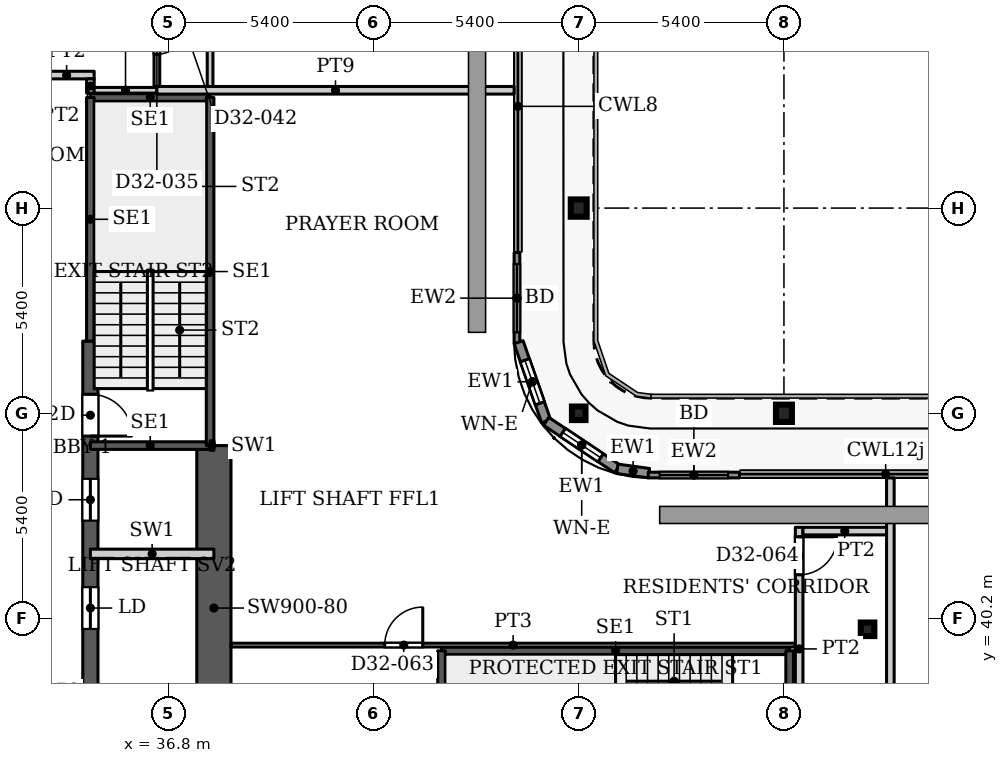
"""IFC4 building model, lengths in metres.
Left out: names, types, materials, properties, quantities, classifications, styles, units other than length and angle.
Written with IfcOpenShell. Run it as: python <this file> out.ifc"""

import sys

from ifc_helpers import new_model, si_unit, direction, frame, frame_2d, origin, origin_2d, place, context, subcontext, project, spatial, rectangle, hollow_rectangle, i_section, extrude, source, transform, mapped, element, fill, save


model = new_model("IFC4")
c1 = context("Model", 3, precision=1e-05, world=origin(), true_north=direction((0.0, 1.0)))
c2 = subcontext(c1, "Body", "Model", "MODEL_VIEW")
j1 = project(units=[si_unit("LENGTHUNIT", "METRE"), si_unit("PLANEANGLEUNIT", "RADIAN")], contexts=[c1])
p1 = place(None, origin())
s1 = spatial("IfcSite", under=j1, at=p1, CompositionType="ELEMENT")
p2 = place(p1, origin())
s2 = spatial("IfcBuilding", under=s1, at=p2, CompositionType="ELEMENT")
p3 = place(p2, frame((0.0, 0.0, 137.0)))
s3 = spatial("IfcBuildingStorey", under=s2, at=p3, CompositionType="ELEMENT", Elevation=137.0)
for number, where, z_axis, x_axis in (
    (1, (53.0, 45.6, 0.0), (0.0, 0.0, 1.0), (1.0, 0.0, 0.0)),
    (2, (47.6, 51.0, 0.0), (0.0, 0.0, 1.0), (1.0, 0.0, 0.0)),
):
    element("IfcColumn", number, at=place(p3, frame(where, z_axis=z_axis, x_axis=x_axis)), inside=s3, PredefinedType="COLUMN", context=c2, shape_type="SweptSolid", body=[
        extrude(i_section(OverallWidth=0.418, OverallDepth=0.455, WebThickness=0.042, FlangeThickness=0.068, FilletRadius=0.014, at=origin_2d()), origin(), (0.0, 0.0, 1.0), 3.9),
    ])
for number, where, z_axis, x_axis in (
    (3, (55.2, 39.916, 0.0), (0.0, 0.0, 1.0), (1.0, 0.0, 0.0)),
    (4, (47.6, 45.6, 0.0), (0.0, 0.0, 1.0), (1.0, 0.0, 0.0)),
):
    element("IfcColumn", number, at=place(p3, frame(where, z_axis=z_axis, x_axis=x_axis)), inside=s3, PredefinedType="COLUMN", context=c2, shape_type="SweptSolid", body=[
        extrude(hollow_rectangle(XDim=0.356, YDim=0.356, WallThickness=0.016, InnerFilletRadius=0.016, OuterFilletRadius=0.032, at=origin_2d()), origin(), (0.0, 0.0, 1.0), 3.9),
    ])
p4 = place(p3, frame((34.75, 29.05, 0.0), z_axis=(0.0, 0.0, 1.0), x_axis=(0.0, 1.0, 0.0)))
e5 = element("IfcWall", 5, at=p4, inside=s3, PredefinedType="SHEAR", context=c2, shape_type="SweptSolid", body=[
    extrude(rectangle(XDim=18.45, YDim=0.4, at=frame_2d((9.225, 0.0))), origin(), (0.0, 0.0, 1.0), 3.9),
])
p5 = place(p4, frame((8.025, 0.0, 0.0)))
e6 = element("IfcOpeningElement", 6, at=p5, cuts=e5, PredefinedType="OPENING", context=c2, shape_type="SweptSolid", body=[
    extrude(rectangle(XDim=1.1, YDim=2.2, at=frame_2d((0.55, 1.1))), frame((0.0, 0.21, 0.0), z_axis=(0.0, -1.0, 0.0), x_axis=(1.0, 0.0, 0.0)), (0.0, 0.0, 1.0), 0.42),
])
p6 = place(p4, frame((10.875, 0.0, 0.0)))
e7 = element("IfcOpeningElement", 7, at=p6, cuts=e5, PredefinedType="OPENING", context=c2, shape_type="SweptSolid", body=[
    extrude(rectangle(XDim=1.1, YDim=2.2, at=frame_2d((0.55, 1.1))), frame((0.0, 0.21, 0.0), z_axis=(0.0, -1.0, 0.0), x_axis=(1.0, 0.0, 0.0)), (0.0, 0.0, 1.0), 0.42),
])
p7 = place(p4, frame((13.725, 0.0, 0.0)))
e8 = element("IfcOpeningElement", 8, at=p7, cuts=e5, PredefinedType="OPENING", context=c2, shape_type="SweptSolid", body=[
    extrude(rectangle(XDim=1.1, YDim=2.2, at=frame_2d((0.55, 1.1))), frame((0.0, 0.21, 0.0), z_axis=(0.0, -1.0, 0.0), x_axis=(1.0, 0.0, 0.0)), (0.0, 0.0, 1.0), 0.42),
])
p8 = place(p4, frame((15.95, 0.0, 0.0)))
e9 = element("IfcOpeningElement", 9, at=p8, cuts=e5, PredefinedType="OPENING", context=c2, shape_type="SweptSolid", body=[
    extrude(rectangle(XDim=1.1, YDim=2.2, at=frame_2d((0.55, 1.1))), frame((0.0, 0.21, 0.0), z_axis=(0.0, -1.0, 0.0), x_axis=(1.0, 0.0, 0.0)), (0.0, 0.0, 1.0), 0.42),
])
p9 = place(p3, frame((38.0, 36.2, 0.0), z_axis=(0.0, 0.0, 1.0), x_axis=(0.0, 1.0, 0.0)))
e10 = element("IfcWall", 10, at=p9, inside=s3, PredefinedType="SHEAR", context=c2, shape_type="SweptSolid", body=[
    extrude(rectangle(XDim=8.55, YDim=0.9, at=frame_2d((4.275, 0.0))), origin(), (0.0, 0.0, 1.0), 3.9),
])
p10 = place(p3, frame((45.975, 49.83, 0.0), z_axis=(0.0, 0.0, 1.0), x_axis=(0.0, -1.0, 0.0)))
e11 = element("IfcWall", 11, at=p10, inside=s3, PredefinedType="SOLIDWALL", context=c2, shape_type="SweptSolid", body=[
    extrude(rectangle(XDim=2.4, YDim=0.15, at=frame_2d((1.2, 0.0))), origin(), (0.0, 0.0, 1.0), 3.75),
])
p11 = place(p10, frame((0.3, 0.0, 0.0)))
e12 = element("IfcOpeningElement", 12, at=p11, cuts=e11, PredefinedType="OPENING", context=c2, shape_type="SweptSolid", body=[
    extrude(rectangle(XDim=1.8, YDim=2.4, at=frame_2d((0.9, 1.2))), frame((0.0, 0.085, 0.0), z_axis=(0.0, -1.0, 0.0), x_axis=(1.0, 0.0, 0.0)), (0.0, 0.0, 1.0), 0.17),
])
p12 = place(p3, frame((46.018, 47.471, 0.0), z_axis=(0.0, 0.0, 1.0), x_axis=(0.328791208903, -0.944402637093, 0.0)))
e13 = element("IfcWall", 13, at=p12, inside=s3, PredefinedType="SOLIDWALL", context=c2, shape_type="SweptSolid", body=[
    extrude(rectangle(XDim=2.205, YDim=0.25, at=frame_2d((1.102, 0.0))), origin(), (0.0, 0.0, 1.0), 3.75),
])
p13 = place(p12, frame((0.503, 0.0, 0.6)))
e14 = element("IfcOpeningElement", 14, at=p13, cuts=e13, PredefinedType="OPENING", context=c2, shape_type="SweptSolid", body=[
    extrude(rectangle(XDim=1.2, YDim=2.1, at=frame_2d((0.6, 1.05))), frame((0.0, 0.135, 0.0), z_axis=(0.0, -1.0, 0.0), x_axis=(1.0, 0.0, 0.0)), (0.0, 0.0, 1.0), 0.27),
])
p14 = place(p3, frame((46.743, 45.389, 0.0), z_axis=(0.0, 0.0, 1.0), x_axis=(0.831449265529, -0.555600682912, 0.0)))
e15 = element("IfcWall", 15, at=p14, inside=s3, PredefinedType="SOLIDWALL", context=c2, shape_type="SweptSolid", body=[
    extrude(rectangle(XDim=2.251, YDim=0.25, at=frame_2d((1.126, 0.0))), origin(), (0.0, 0.0, 1.0), 3.75),
])
p15 = place(p14, frame((0.525, 0.0, 0.6)))
e16 = element("IfcOpeningElement", 16, at=p15, cuts=e15, PredefinedType="OPENING", context=c2, shape_type="SweptSolid", body=[
    extrude(rectangle(XDim=1.2, YDim=2.1, at=frame_2d((0.6, 1.05))), frame((0.0, 0.135, 0.0), z_axis=(0.0, -1.0, 0.0), x_axis=(1.0, 0.0, 0.0)), (0.0, 0.0, 1.0), 0.27),
])
p16 = place(p3, frame((48.615, 44.138, 0.0), z_axis=(0.0, 0.0, 1.0), x_axis=(0.990741504246, -0.135761819977, 0.0)))
e17 = element("IfcWall", 17, at=p16, inside=s3, PredefinedType="SOLIDWALL", context=c2, shape_type="SweptSolid", body=[
    extrude(rectangle(XDim=0.84, YDim=0.25, at=frame_2d((0.42, 0.0))), origin(), (0.0, 0.0, 1.0), 3.75),
])
p17 = place(p3, frame((49.43, 43.975, 0.0), z_axis=(0.0, 0.0, 1.0), x_axis=(1.0, 0.0, 0.0)))
e18 = element("IfcWall", 18, at=p17, inside=s3, PredefinedType="SOLIDWALL", context=c2, shape_type="SweptSolid", body=[
    extrude(rectangle(XDim=2.4, YDim=0.15, at=frame_2d((1.2, 0.0))), origin(), (0.0, 0.0, 1.0), 3.75),
])
p18 = place(p17, frame((0.3, 0.0, 0.0)))
e19 = element("IfcOpeningElement", 19, at=p18, cuts=e18, PredefinedType="OPENING", context=c2, shape_type="SweptSolid", body=[
    extrude(rectangle(XDim=1.8, YDim=2.4, at=frame_2d((0.9, 1.2))), frame((0.0, 0.085, 0.0), z_axis=(0.0, -1.0, 0.0), x_axis=(1.0, 0.0, 0.0)), (0.0, 0.0, 1.0), 0.17),
])
p19 = place(p3, frame((43.99, 39.35, 0.0), z_axis=(0.0, 0.0, 1.0), x_axis=(1.0, 0.0, 0.0)))
e20 = element("IfcWall", 20, at=p19, inside=s3, PredefinedType="SHEAR", context=c2, shape_type="SweptSolid", body=[
    extrude(rectangle(XDim=9.16, YDim=0.2, at=frame_2d((4.58, 0.0))), origin(), (0.0, 0.0, 1.0), 3.9),
])
for number, where, z_axis, x_axis in (
    (21, (43.99, 36.2, 0.0), (0.0, 0.0, 1.0), (0.0, 1.0, 0.0)),
    (22, (53.15, 36.2, 0.0), (0.0, 0.0, 1.0), (0.0, 1.0, 0.0)),
):
    element("IfcWall", number, at=place(p3, frame(where, z_axis=z_axis, x_axis=x_axis)), inside=s3, PredefinedType="SHEAR", context=c2, shape_type="SweptSolid", body=[
        extrude(rectangle(XDim=3.15, YDim=0.2, at=frame_2d((1.575, 0.0))), origin(), (0.0, 0.0, 1.0), 3.9),
    ])
for number, where, z_axis, x_axis in (
    (23, (34.75, 44.75, 0.0), (0.0, 0.0, 1.0), (1.0, 0.0, 0.0)),
    (24, (34.75, 53.91, 0.0), (0.0, 0.0, 1.0), (1.0, 0.0, 0.0)),
):
    element("IfcWall", number, at=place(p3, frame(where, z_axis=z_axis, x_axis=x_axis)), inside=s3, PredefinedType="SHEAR", context=c2, shape_type="SweptSolid", body=[
        extrude(rectangle(XDim=3.15, YDim=0.2, at=frame_2d((1.575, 0.0))), origin(), (0.0, 0.0, 1.0), 3.9),
    ])
p20 = place(p3, frame((34.75, 47.5, 0.0), z_axis=(0.0, 0.0, 1.0), x_axis=(0.0, 1.0, 0.0)))
e25 = element("IfcWall", 25, at=p20, inside=s3, PredefinedType="SHEAR", context=c2, shape_type="SweptSolid", body=[
    extrude(rectangle(XDim=6.41, YDim=0.2, at=frame_2d((3.205, 0.0))), origin(), (0.0, 0.0, 1.0), 3.9),
])
p21 = place(p3, frame((37.9, 44.75, 0.0), z_axis=(0.0, 0.0, 1.0), x_axis=(0.0, 1.0, 0.0)))
e26 = element("IfcWall", 26, at=p21, inside=s3, PredefinedType="SHEAR", context=c2, shape_type="SweptSolid", body=[
    extrude(rectangle(XDim=9.16, YDim=0.2, at=frame_2d((4.58, 0.0))), origin(), (0.0, 0.0, 1.0), 3.9),
])
p22 = place(p3, frame((34.75, 41.9, 0.0), z_axis=(0.0, 0.0, 1.0), x_axis=(1.0, 0.0, 0.0)))
e27 = element("IfcWall", 27, at=p22, inside=s3, PredefinedType="PARTITIONING", context=c2, shape_type="SweptSolid", body=[
    extrude(rectangle(XDim=3.25, YDim=0.25, at=frame_2d((1.625, 0.0))), origin(), (0.0, 0.0, 1.0), 3.9),
])
p23 = place(p3, frame((37.9, 44.75, 0.0), z_axis=(0.0, 0.0, 1.0), x_axis=(1.0, 0.0, 0.0)))
e28 = element("IfcWall", 28, at=p23, inside=s3, PredefinedType="PARTITIONING", context=c2, shape_type="SweptSolid", body=[
    extrude(rectangle(XDim=0.1, YDim=0.25, at=frame_2d((0.05, 0.0))), origin(), (0.0, 0.0, 1.0), 3.9),
])
p24 = place(p3, frame((33.4, 54.5, 0.0), z_axis=(0.0, 0.0, 1.0), x_axis=(1.0, 0.0, 0.0)))
e29 = element("IfcWall", 29, at=p24, inside=s3, PredefinedType="PARTITIONING", context=c2, shape_type="SweptSolid", body=[
    extrude(rectangle(XDim=1.45, YDim=0.2, at=frame_2d((0.725, 0.0))), origin(), (0.0, 0.0, 1.0), 3.6),
])
p25 = place(p3, frame((34.75, 54.025, 0.0), z_axis=(0.0, 0.0, 1.0), x_axis=(0.0, 1.0, 0.0)))
e30 = element("IfcWall", 30, at=p25, inside=s3, PredefinedType="PARTITIONING", context=c2, shape_type="SweptSolid", body=[
    extrude(rectangle(XDim=0.375, YDim=0.2, at=frame_2d((0.188, 0.0))), origin(), (0.0, 0.0, 1.0), 3.6),
])
p26 = place(p3, frame((34.85, 54.1, 0.0), z_axis=(0.0, 0.0, 1.0), x_axis=(1.0, 0.0, 0.0)))
e31 = element("IfcWall", 31, at=p26, inside=s3, PredefinedType="PARTITIONING", context=c2, shape_type="SweptSolid", body=[
    extrude(rectangle(XDim=1.65, YDim=0.15, at=frame_2d((0.825, 0.0))), origin(), (0.0, 0.0, 1.0), 3.6),
])
p27 = place(p3, frame((36.5, 54.1, 0.0), z_axis=(0.0, 0.0, 1.0), x_axis=(1.0, 0.0, 0.0)))
e32 = element("IfcWall", 32, at=p27, inside=s3, PredefinedType="PARTITIONING", context=c2, shape_type="SweptSolid", body=[
    extrude(rectangle(XDim=9.4, YDim=0.2, at=frame_2d((4.7, 0.0))), origin(), (0.0, 0.0, 1.0), 3.6),
])
p28 = place(p3, frame((36.5, 54.2, 0.0), z_axis=(0.0, 0.0, 1.0), x_axis=(0.0, 1.0, 0.0)))
e33 = element("IfcWall", 33, at=p28, inside=s3, PredefinedType="PARTITIONING", context=c2, shape_type="SweptSolid", body=[
    extrude(rectangle(XDim=11.05, YDim=0.15, at=frame_2d((5.525, 0.0))), origin(), (0.0, 0.0, 1.0), 3.6),
])
p29 = place(p28, frame((0.85, 0.0, 0.0)))
e34 = element("IfcOpeningElement", 34, at=p29, cuts=e33, PredefinedType="OPENING", context=c2, shape_type="SweptSolid", body=[
    extrude(rectangle(XDim=0.8, YDim=2.1, at=frame_2d((0.4, 1.05))), frame((0.0, 0.085, 0.0), z_axis=(0.0, -1.0, 0.0), x_axis=(1.0, 0.0, 0.0)), (0.0, 0.0, 1.0), 0.17),
])
p30 = place(p28, frame((8.35, 0.0, 0.0)))
e35 = element("IfcOpeningElement", 35, at=p30, cuts=e33, PredefinedType="OPENING", context=c2, shape_type="SweptSolid", body=[
    extrude(rectangle(XDim=0.9, YDim=2.1, at=frame_2d((0.45, 1.05))), frame((0.0, 0.085, 0.0), z_axis=(0.0, -1.0, 0.0), x_axis=(1.0, 0.0, 0.0)), (0.0, 0.0, 1.0), 0.17),
])
p31 = place(p28, frame((3.25, 0.0, 0.0)))
e36 = element("IfcOpeningElement", 36, at=p31, cuts=e33, PredefinedType="OPENING", context=c2, shape_type="SweptSolid", body=[
    extrude(rectangle(XDim=0.8, YDim=2.1, at=frame_2d((0.4, 1.05))), frame((0.0, 0.085, 0.0), z_axis=(0.0, -1.0, 0.0), x_axis=(1.0, 0.0, 0.0)), (0.0, 0.0, 1.0), 0.17),
])
p32 = place(p28, frame((5.35, 0.0, 0.0)))
e37 = element("IfcOpeningElement", 37, at=p32, cuts=e33, PredefinedType="OPENING", context=c2, shape_type="SweptSolid", body=[
    extrude(rectangle(XDim=0.8, YDim=2.1, at=frame_2d((0.4, 1.05))), frame((0.0, 0.085, 0.0), z_axis=(0.0, -1.0, 0.0), x_axis=(1.0, 0.0, 0.0)), (0.0, 0.0, 1.0), 0.17),
])
p33 = place(p3, frame((37.9, 54.2, 0.0), z_axis=(0.0, 0.0, 1.0), x_axis=(0.0, 1.0, 0.0)))
e38 = element("IfcWall", 38, at=p33, inside=s3, PredefinedType="PARTITIONING", context=c2, shape_type="SweptSolid", body=[
    extrude(rectangle(XDim=13.6, YDim=0.15, at=frame_2d((6.8, 0.0))), origin(), (0.0, 0.0, 1.0), 3.6),
])
p34 = place(p33, frame((1.25, 0.0, 0.0)))
e39 = element("IfcOpeningElement", 39, at=p34, cuts=e38, PredefinedType="OPENING", context=c2, shape_type="SweptSolid", body=[
    extrude(rectangle(XDim=0.9, YDim=2.1, at=frame_2d((0.45, 1.05))), frame((0.0, 0.085, 0.0), z_axis=(0.0, -1.0, 0.0), x_axis=(1.0, 0.0, 0.0)), (0.0, 0.0, 1.0), 0.17),
])
p35 = place(p33, frame((5.55, 0.0, 0.0)))
e40 = element("IfcOpeningElement", 40, at=p35, cuts=e38, PredefinedType="OPENING", context=c2, shape_type="SweptSolid", body=[
    extrude(rectangle(XDim=1.0, YDim=2.1, at=frame_2d((0.5, 1.05))), frame((0.0, 0.085, 0.0), z_axis=(0.0, -1.0, 0.0), x_axis=(1.0, 0.0, 0.0)), (0.0, 0.0, 1.0), 0.17),
])
p36 = place(p33, frame((11.75, 0.0, 0.0)))
e41 = element("IfcOpeningElement", 41, at=p36, cuts=e38, PredefinedType="OPENING", context=c2, shape_type="SweptSolid", body=[
    extrude(rectangle(XDim=0.9, YDim=2.1, at=frame_2d((0.45, 1.05))), frame((0.0, 0.085, 0.0), z_axis=(0.0, -1.0, 0.0), x_axis=(1.0, 0.0, 0.0)), (0.0, 0.0, 1.0), 0.17),
])
p37 = place(p3, frame((38.449, 39.5, 0.0), z_axis=(0.0, 0.0, 1.0), x_axis=(1.0, 0.0, 0.0)))
e42 = element("IfcWall", 42, at=p37, inside=s3, PredefinedType="PARTITIONING", context=c2, shape_type="SweptSolid", body=[
    extrude(rectangle(XDim=14.851, YDim=0.1, at=frame_2d((7.426, 0.0))), origin(), (0.0, 0.0, 1.0), 3.6),
])
p38 = place(p37, frame((4.047, 0.0, 0.0)))
e43 = element("IfcOpeningElement", 43, at=p38, cuts=e42, PredefinedType="OPENING", context=c2, shape_type="SweptSolid", body=[
    extrude(rectangle(XDim=1.0, YDim=2.1, at=frame_2d((0.5, 1.05))), frame((0.0, 0.06, 0.0), z_axis=(0.0, -1.0, 0.0), x_axis=(1.0, 0.0, 0.0)), (0.0, 0.0, 1.0), 0.12),
])
p39 = place(p3, frame((53.4, 36.199, 0.0), z_axis=(0.0, 0.0, 1.0), x_axis=(0.0, 1.0, 0.0)))
e44 = element("IfcWall", 44, at=p39, inside=s3, PredefinedType="PARTITIONING", context=c2, shape_type="SweptSolid", body=[
    extrude(rectangle(XDim=6.401, YDim=0.2, at=frame_2d((3.201, 0.0))), origin(), (0.0, 0.0, 1.0), 3.6),
])
p40 = place(p39, frame((5.151, 0.0, 0.0)))
e45 = element("IfcOpeningElement", 45, at=p40, cuts=e44, PredefinedType="OPENING", context=c2, shape_type="SweptSolid", body=[
    extrude(rectangle(XDim=1.0, YDim=2.1, at=frame_2d((0.5, 1.05))), frame((0.0, 0.11, 0.0), z_axis=(0.0, -1.0, 0.0), x_axis=(1.0, 0.0, 0.0)), (0.0, 0.0, 1.0), 0.22),
])
p41 = place(p3, frame((53.5, 42.5, 0.0), z_axis=(0.0, 0.0, 1.0), x_axis=(1.0, 0.0, 0.0)))
e46 = element("IfcWall", 46, at=p41, inside=s3, PredefinedType="PARTITIONING", context=c2, shape_type="SweptSolid", body=[
    extrude(rectangle(XDim=2.2, YDim=0.2, at=frame_2d((1.1, 0.0))), origin(), (0.0, 0.0, 1.0), 3.6),
])
p42 = place(p3, frame((55.8, 30.4, 0.0), z_axis=(0.0, 0.0, 1.0), x_axis=(0.0, 1.0, 0.0)))
e47 = element("IfcWall", 47, at=p42, inside=s3, PredefinedType="PARTITIONING", context=c2, shape_type="SweptSolid", body=[
    extrude(rectangle(XDim=13.5, YDim=0.2, at=frame_2d((6.75, 0.0))), origin(), (0.0, 0.0, 1.0), 3.6),
])
m1 = source(origin(), c2, "Body", "SweptSolid", [
    extrude(rectangle(XDim=1.8, YDim=2.4, at=frame_2d((0.9, 1.2))), frame((0.0, 0.025, 0.0), z_axis=(0.0, -1.0, 0.0), x_axis=(1.0, 0.0, 0.0)), (0.0, 0.0, 1.0), 0.05),
])
p43 = place(p11, origin())
e48 = element("IfcDoor", 48, at=p43, inside=s3, OperationType="SLIDING_TO_LEFT", PredefinedType="DOOR", context=c2, shape_type="MappedRepresentation", body=[
    mapped(m1, transform((0.0, 0.0, 0.0), x_axis=(1.0, 0.0, 0.0), y_axis=(0.0, 1.0, 0.0), z_axis=(0.0, 0.0, 1.0), scale=1.0)),
])
fill(e12, e48)
m2 = source(origin(), c2, "Body", "SweptSolid", [
    extrude(rectangle(XDim=1.2, YDim=2.1, at=frame_2d((0.6, 1.05))), frame((0.0, 0.03, 0.0), z_axis=(0.0, -1.0, 0.0), x_axis=(1.0, 0.0, 0.0)), (0.0, 0.0, 1.0), 0.06),
])
p44 = place(p13, origin())
e49 = element("IfcWindow", 49, at=p44, inside=s3, PartitioningType="SINGLE_PANEL", PredefinedType="WINDOW", context=c2, shape_type="MappedRepresentation", body=[
    mapped(m2, transform((0.0, 0.0, 0.0), x_axis=(1.0, 0.0, 0.0), y_axis=(0.0, 1.0, 0.0), z_axis=(0.0, 0.0, 1.0), scale=1.0)),
])
fill(e14, e49)
p45 = place(p15, origin())
e50 = element("IfcWindow", 50, at=p45, inside=s3, PartitioningType="SINGLE_PANEL", PredefinedType="WINDOW", context=c2, shape_type="MappedRepresentation", body=[
    mapped(m2, transform((0.0, 0.0, 0.0), x_axis=(1.0, 0.0, 0.0), y_axis=(0.0, 1.0, 0.0), z_axis=(0.0, 0.0, 1.0), scale=1.0)),
])
fill(e16, e50)
p46 = place(p18, origin())
e51 = element("IfcDoor", 51, at=p46, inside=s3, OperationType="SLIDING_TO_LEFT", PredefinedType="DOOR", context=c2, shape_type="MappedRepresentation", body=[
    mapped(m1, transform((0.0, 0.0, 0.0), x_axis=(1.0, 0.0, 0.0), y_axis=(0.0, 1.0, 0.0), z_axis=(0.0, 0.0, 1.0), scale=1.0)),
])
fill(e19, e51)
m3 = source(origin(), c2, "Body", "SweptSolid", [
    extrude(rectangle(XDim=1.1, YDim=2.2, at=frame_2d((0.55, 1.1))), frame((0.0, 0.025, 0.0), z_axis=(0.0, -1.0, 0.0), x_axis=(1.0, 0.0, 0.0)), (0.0, 0.0, 1.0), 0.05),
])
p47 = place(p6, origin())
e52 = element("IfcDoor", 52, at=p47, inside=s3, OperationType="SLIDING_TO_LEFT", PredefinedType="DOOR", context=c2, shape_type="MappedRepresentation", body=[
    mapped(m3, transform((0.0, 0.0, 0.0), x_axis=(1.0, 0.0, 0.0), y_axis=(0.0, 1.0, 0.0), z_axis=(0.0, 0.0, 1.0), scale=1.0)),
])
fill(e7, e52)
p48 = place(p7, origin())
e53 = element("IfcDoor", 53, at=p48, inside=s3, OperationType="SLIDING_TO_LEFT", PredefinedType="DOOR", context=c2, shape_type="MappedRepresentation", body=[
    mapped(m3, transform((0.0, 0.0, 0.0), x_axis=(1.0, 0.0, 0.0), y_axis=(0.0, 1.0, 0.0), z_axis=(0.0, 0.0, 1.0), scale=1.0)),
])
fill(e8, e53)
m4 = source(origin(), c2, "Body", "SweptSolid", [
    extrude(rectangle(XDim=1.1, YDim=2.2, at=frame_2d((0.55, 1.1))), frame((0.0, 0.025, 0.0), z_axis=(0.0, -1.0, 0.0), x_axis=(1.0, 0.0, 0.0)), (0.0, 0.0, 1.0), 0.05),
])
p49 = place(p8, origin())
e54 = element("IfcDoor", 54, at=p49, inside=s3, OperationType="SINGLE_SWING_RIGHT", PredefinedType="DOOR", context=c2, shape_type="MappedRepresentation", body=[
    mapped(m4, transform((0.0, 0.0, 0.0), x_axis=(1.0, 0.0, 0.0), y_axis=(0.0, 1.0, 0.0), z_axis=(0.0, 0.0, 1.0), scale=1.0)),
])
fill(e9, e54)
m5 = source(origin(), c2, "Body", "SweptSolid", [
    extrude(rectangle(XDim=0.8, YDim=2.1, at=frame_2d((0.4, 1.05))), frame((0.0, 0.025, 0.0), z_axis=(0.0, -1.0, 0.0), x_axis=(1.0, 0.0, 0.0)), (0.0, 0.0, 1.0), 0.05),
])
p50 = place(p29, origin())
e55 = element("IfcDoor", 55, at=p50, inside=s3, OperationType="SINGLE_SWING_RIGHT", PredefinedType="DOOR", context=c2, shape_type="MappedRepresentation", body=[
    mapped(m5, transform((0.0, 0.0, 0.0), x_axis=(1.0, 0.0, 0.0), y_axis=(0.0, 1.0, 0.0), z_axis=(0.0, 0.0, 1.0), scale=1.0)),
])
fill(e34, e55)
m6 = source(origin(), c2, "Body", "SweptSolid", [
    extrude(rectangle(XDim=1.0, YDim=2.1, at=frame_2d((0.5, 1.05))), frame((0.0, 0.025, 0.0), z_axis=(0.0, -1.0, 0.0), x_axis=(1.0, 0.0, 0.0)), (0.0, 0.0, 1.0), 0.05),
])
p51 = place(p38, origin())
e56 = element("IfcDoor", 56, at=p51, inside=s3, OperationType="SINGLE_SWING_LEFT", PredefinedType="DOOR", context=c2, shape_type="MappedRepresentation", body=[
    mapped(m6, transform((0.0, 0.0, 0.0), x_axis=(1.0, 0.0, 0.0), y_axis=(0.0, 1.0, 0.0), z_axis=(0.0, 0.0, 1.0), scale=1.0)),
])
fill(e43, e56)
m7 = source(origin(), c2, "Body", "SweptSolid", [
    extrude(rectangle(XDim=1.0, YDim=2.1, at=frame_2d((0.5, 1.05))), frame((0.0, 0.025, 0.0), z_axis=(0.0, -1.0, 0.0), x_axis=(1.0, 0.0, 0.0)), (0.0, 0.0, 1.0), 0.05),
])
p52 = place(p40, origin())
e57 = element("IfcDoor", 57, at=p52, inside=s3, OperationType="SINGLE_SWING_RIGHT", PredefinedType="DOOR", context=c2, shape_type="MappedRepresentation", body=[
    mapped(m7, transform((0.0, 0.0, 0.0), x_axis=(1.0, 0.0, 0.0), y_axis=(0.0, 1.0, 0.0), z_axis=(0.0, 0.0, 1.0), scale=1.0)),
])
fill(e45, e57)
save(model, sys.argv[1])
